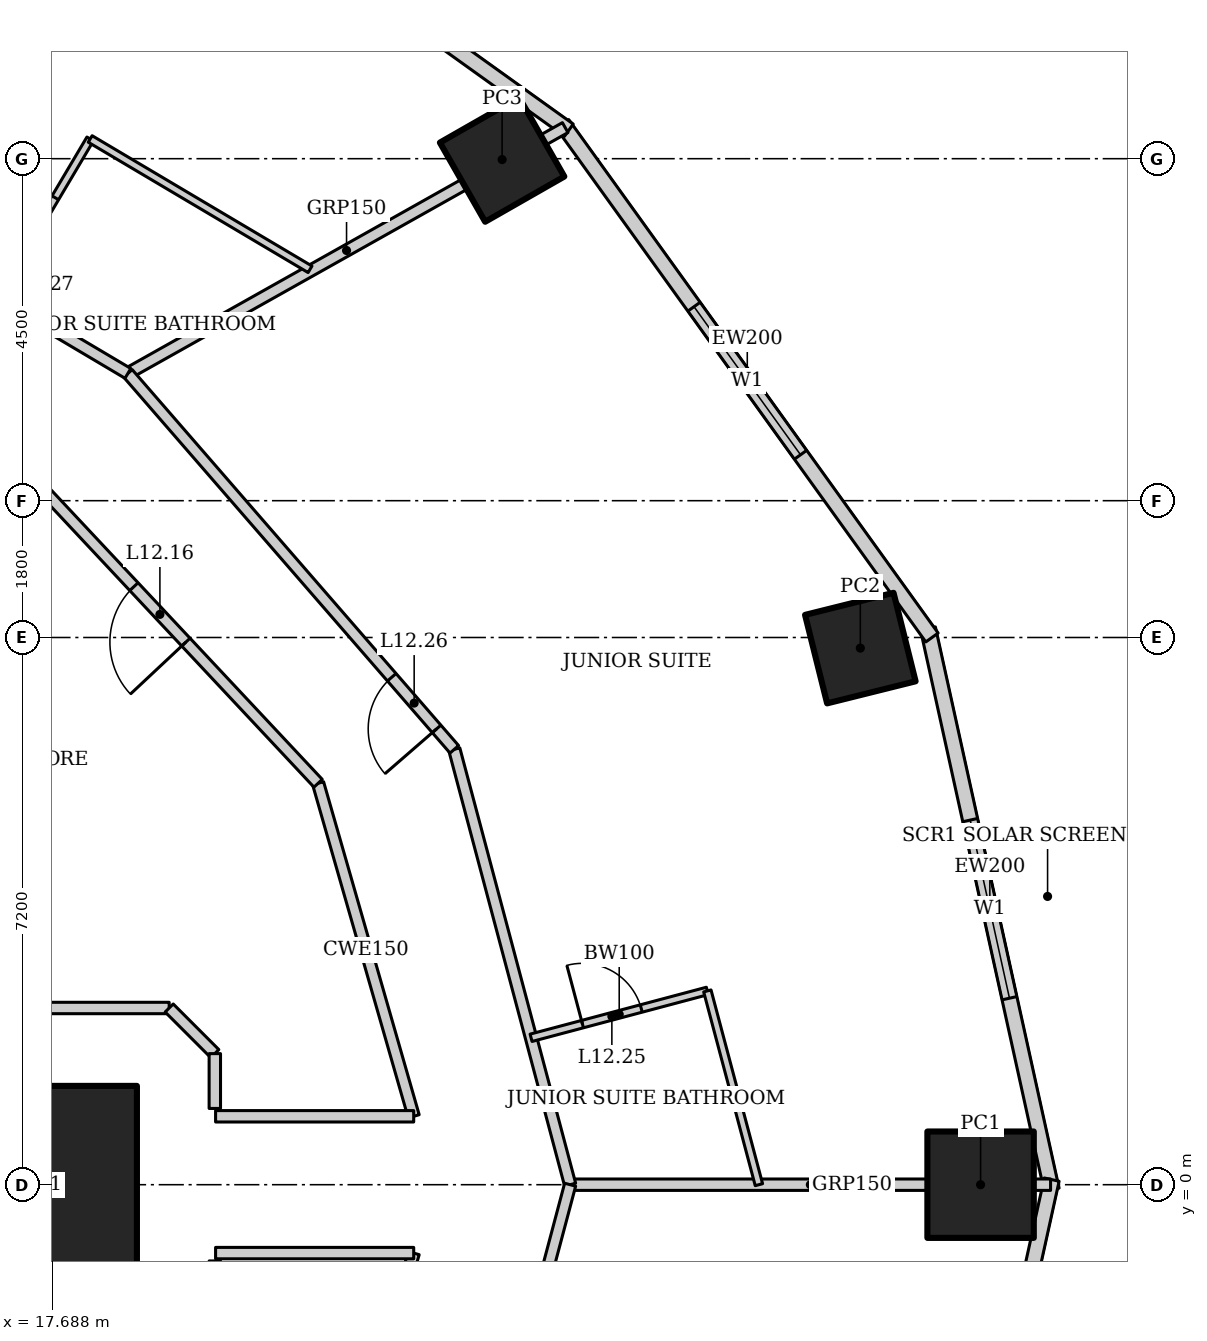
"""IFC4 building model, lengths in metres.
Left out: names, types, materials, properties, quantities, classifications, styles, units other than length and angle.
Written with IfcOpenShell. Run it as: python <this file> out.ifc"""

import sys

from ifc_helpers import new_model, si_unit, direction, frame, frame_2d, origin, origin_2d, place, context, subcontext, project, spatial, rectangle, hollow_rectangle, extrude, element, fill, save


model = new_model("IFC4")
c1 = context("Model", 3, precision=1e-05, world=origin(), true_north=direction((0.0, 1.0)))
c2 = subcontext(c1, "Body", "Model", "MODEL_VIEW")
j1 = project(units=[si_unit("LENGTHUNIT", "METRE"), si_unit("PLANEANGLEUNIT", "RADIAN")], contexts=[c1])
p1 = place(None, origin())
s1 = spatial("IfcSite", under=j1, at=p1, CompositionType="ELEMENT")
p2 = place(p1, origin())
s2 = spatial("IfcBuilding", under=s1, at=p2, CompositionType="ELEMENT")
p3 = place(p2, frame((0.0, 0.0, 58.6)))
s3 = spatial("IfcBuildingStorey", under=s2, at=p3, CompositionType="ELEMENT", Elevation=58.6)
p4 = place(p3, frame((17.5, 0.0, 0.0), z_axis=(0.0, 0.0, 1.0), x_axis=(1.0, 0.0, 0.0)))
e1 = element("IfcColumn", 1, at=p4, inside=s3, PredefinedType="COLUMN", context=c2, shape_type="SweptSolid", body=[
    extrude(hollow_rectangle(XDim=2.6, YDim=2.6, WallThickness=0.13, at=origin_2d()), origin(), (0.0, 0.0, 1.0), 3.6),
])
p5 = place(p3, frame((29.9, 0.0, 0.0), z_axis=(0.0, 0.0, 1.0), x_axis=(1.0, 0.0, 0.0)))
e2 = element("IfcColumn", 2, at=p5, inside=s3, PredefinedType="COLUMN", context=c2, shape_type="SweptSolid", body=[
    extrude(hollow_rectangle(XDim=1.4, YDim=1.4, WallThickness=0.1, at=origin_2d()), origin(), (0.0, 0.0, 1.0), 3.6),
])
p6 = place(p3, frame((28.318, 7.06, 0.0), z_axis=(0.0, 0.0, 1.0), x_axis=(0.970295726276, 0.2419218956, 0.0)))
e3 = element("IfcColumn", 3, at=p6, inside=s3, PredefinedType="COLUMN", context=c2, shape_type="SweptSolid", body=[
    extrude(hollow_rectangle(XDim=1.2, YDim=1.2, WallThickness=0.1, at=origin_2d()), origin(), (0.0, 0.0, 1.0), 3.6),
])
p7 = place(p3, frame((23.605, 13.489, 0.0), z_axis=(0.0, 0.0, 1.0), x_axis=(0.86824298017, 0.496139221777, 0.0)))
e4 = element("IfcColumn", 4, at=p7, inside=s3, PredefinedType="COLUMN", context=c2, shape_type="SweptSolid", body=[
    extrude(hollow_rectangle(XDim=1.2, YDim=1.2, WallThickness=0.12, at=origin_2d()), origin(), (0.0, 0.0, 1.0), 3.6),
])
p8 = place(p3, frame((30.835, -0.067, 0.0), z_axis=(0.0, 0.0, 1.0), x_axis=(-0.215238065514, 0.976561608478, 0.0)))
e5 = element("IfcWall", 5, at=p8, inside=s3, PredefinedType="SOLIDWALL", context=c2, shape_type="SweptSolid", body=[
    extrude(rectangle(XDim=7.562, YDim=0.2, at=frame_2d((3.781, 0.0))), origin(), (0.0, 0.0, 1.0), 3.45),
])
p9 = place(p8, frame((2.581, 0.0, 0.5)))
e6 = element("IfcOpeningElement", 6, at=p9, cuts=e5, PredefinedType="OPENING", context=c2, shape_type="SweptSolid", body=[
    extrude(rectangle(XDim=2.4, YDim=2.2, at=frame_2d((1.2, 1.1))), frame((0.0, 0.11, 0.0), z_axis=(0.0, -1.0, 0.0), x_axis=(1.0, 0.0, 0.0)), (0.0, 0.0, 1.0), 0.22),
])
p10 = place(p3, frame((29.26, 7.2, 0.0), z_axis=(0.0, 0.0, 1.0), x_axis=(-0.583937613703, 0.811798536155, 0.0)))
e7 = element("IfcWall", 7, at=p10, inside=s3, PredefinedType="SOLIDWALL", context=c2, shape_type="SweptSolid", body=[
    extrude(rectangle(XDim=8.323, YDim=0.2, at=frame_2d((4.162, 0.0))), origin(), (0.0, 0.0, 1.0), 3.45),
])
p11 = place(p10, frame((2.961, 0.0, 0.5)))
e8 = element("IfcOpeningElement", 8, at=p11, cuts=e7, PredefinedType="OPENING", context=c2, shape_type="SweptSolid", body=[
    extrude(rectangle(XDim=2.4, YDim=2.2, at=frame_2d((1.2, 1.1))), frame((0.0, 0.11, 0.0), z_axis=(0.0, -1.0, 0.0), x_axis=(1.0, 0.0, 0.0)), (0.0, 0.0, 1.0), 0.22),
])
p12 = place(p3, frame((24.482, 13.875, 0.0), z_axis=(0.0, 0.0, 1.0), x_axis=(-0.812791321576, 0.582554948112, 0.0)))
e9 = element("IfcWall", 9, at=p12, inside=s3, PredefinedType="SOLIDWALL", context=c2, shape_type="SweptSolid", body=[
    extrude(rectangle(XDim=8.063, YDim=0.2, at=frame_2d((4.032, 0.0))), origin(), (0.0, 0.0, 1.0), 3.45),
])
p13 = place(p12, frame((2.832, 0.0, 0.5)))
e10 = element("IfcOpeningElement", 10, at=p13, cuts=e9, PredefinedType="OPENING", context=c2, shape_type="SweptSolid", body=[
    extrude(rectangle(XDim=2.4, YDim=2.2, at=frame_2d((1.2, 1.1))), frame((0.0, 0.11, 0.0), z_axis=(0.0, -1.0, 0.0), x_axis=(1.0, 0.0, 0.0)), (0.0, 0.0, 1.0), 0.22),
])
p14 = place(p3, frame((29.208, -7.318, 0.0), z_axis=(0.0, 0.0, 1.0), x_axis=(0.215238065514, 0.976561608478, 0.0)))
e11 = element("IfcWall", 11, at=p14, inside=s3, PredefinedType="SOLIDWALL", context=c2, shape_type="SweptSolid", body=[
    extrude(rectangle(XDim=7.562, YDim=0.2, at=frame_2d((3.781, 0.0))), origin(), (0.0, 0.0, 1.0), 3.45),
])
p15 = place(p14, frame((2.581, 0.0, 0.5)))
e12 = element("IfcOpeningElement", 12, at=p15, cuts=e11, PredefinedType="OPENING", context=c2, shape_type="SweptSolid", body=[
    extrude(rectangle(XDim=2.4, YDim=2.2, at=frame_2d((1.2, 1.1))), frame((0.0, 0.11, 0.0), z_axis=(0.0, -1.0, 0.0), x_axis=(1.0, 0.0, 0.0)), (0.0, 0.0, 1.0), 0.22),
])
p16 = place(p3, frame((30.821, 0.0, 0.0), z_axis=(0.0, 0.0, 1.0), x_axis=(-1.0, 0.0, 0.0)))
e13 = element("IfcWall", 13, at=p16, inside=s3, PredefinedType="PARTITIONING", context=c2, shape_type="SweptSolid", body=[
    extrude(rectangle(XDim=6.321, YDim=0.15, at=frame_2d((3.16, 0.0))), origin(), (0.0, 0.0, 1.0), 2.528),
])
p17 = place(p3, frame((24.435, 13.909, 0.0), z_axis=(0.0, 0.0, 1.0), x_axis=(-0.871747379892, -0.489955616001, 0.0)))
e14 = element("IfcWall", 14, at=p17, inside=s3, PredefinedType="PARTITIONING", context=c2, shape_type="SweptSolid", body=[
    extrude(rectangle(XDim=6.6, YDim=0.15, at=frame_2d((3.3, 0.0))), origin(), (0.0, 0.0, 1.0), 2.693),
])
p18 = place(p3, frame((24.5, 0.0, 0.0), z_axis=(0.0, 0.0, 1.0), x_axis=(-0.257083265334, 0.966389256296, 0.0)))
e15 = element("IfcWall", 15, at=p18, inside=s3, PredefinedType="PARTITIONING", context=c2, shape_type="SweptSolid", body=[
    extrude(rectangle(XDim=5.928, YDim=0.15, at=frame_2d((2.964, 0.0))), origin(), (0.0, 0.0, 1.0), 3.45),
])
p19 = place(p3, frame((22.976, 5.729, 0.0), z_axis=(0.0, 0.0, 1.0), x_axis=(-0.655599989166, 0.755108372491, 0.0)))
e16 = element("IfcWall", 16, at=p19, inside=s3, PredefinedType="PARTITIONING", context=c2, shape_type="SweptSolid", body=[
    extrude(rectangle(XDim=6.551, YDim=0.15, at=frame_2d((3.275, 0.0))), origin(), (0.0, 0.0, 1.0), 3.45),
])
p20 = place(p19, frame((0.356, 0.0, 0.0)))
e17 = element("IfcOpeningElement", 17, at=p20, cuts=e16, PredefinedType="OPENING", context=c2, shape_type="SweptSolid", body=[
    extrude(rectangle(XDim=0.9, YDim=2.1, at=frame_2d((0.45, 1.05))), frame((0.0, 0.085, 0.0), z_axis=(0.0, -1.0, 0.0), x_axis=(1.0, 0.0, 0.0)), (0.0, 0.0, 1.0), 0.17),
])
p21 = place(p3, frame((18.681, 10.675, 0.0), z_axis=(0.0, 0.0, 1.0), x_axis=(-0.860147339762, 0.510045639036, 0.0)))
e18 = element("IfcWall", 18, at=p21, inside=s3, PredefinedType="PARTITIONING", context=c2, shape_type="SweptSolid", body=[
    extrude(rectangle(XDim=6.19, YDim=0.15, at=frame_2d((3.095, 0.0))), origin(), (0.0, 0.0, 1.0), 3.45),
])
p22 = place(p3, frame((22.976, -5.729, 0.0), z_axis=(0.0, 0.0, 1.0), x_axis=(0.257083265334, 0.966389256296, 0.0)))
e19 = element("IfcWall", 19, at=p22, inside=s3, PredefinedType="PARTITIONING", context=c2, shape_type="SweptSolid", body=[
    extrude(rectangle(XDim=5.928, YDim=0.15, at=frame_2d((2.964, 0.0))), origin(), (0.0, 0.0, 1.0), 3.45),
])
p23 = place(p22, frame((1.794, 0.0, 0.0)))
e20 = element("IfcOpeningElement", 20, at=p23, cuts=e19, PredefinedType="OPENING", context=c2, shape_type="SweptSolid", body=[
    extrude(rectangle(XDim=0.9, YDim=2.1, at=frame_2d((0.45, 1.05))), frame((0.0, 0.085, 0.0), z_axis=(0.0, -1.0, 0.0), x_axis=(1.0, 0.0, 0.0)), (0.0, 0.0, 1.0), 0.17),
])
p24 = place(p3, frame((22.442, 0.9, 0.0), z_axis=(0.0, 0.0, 1.0), x_axis=(-0.27585972825, 0.961197903831, 0.0)))
e21 = element("IfcWall", 21, at=p24, inside=s3, PredefinedType="PARTITIONING", context=c2, shape_type="SweptSolid", body=[
    extrude(rectangle(XDim=4.559, YDim=0.15, at=frame_2d((2.279, 0.0))), origin(), (0.0, 0.0, 1.0), 3.45),
])
p25 = place(p3, frame((21.184, 5.282, 0.0), z_axis=(0.0, 0.0, 1.0), x_axis=(-0.68365836236, 0.729802194828, 0.0)))
e22 = element("IfcWall", 22, at=p25, inside=s3, PredefinedType="PARTITIONING", context=c2, shape_type="SweptSolid", body=[
    extrude(rectangle(XDim=6.09, YDim=0.15, at=frame_2d((3.045, 0.0))), origin(), (0.0, 0.0, 1.0), 3.45),
])
p26 = place(p25, frame((2.545, 0.0, 0.0)))
e23 = element("IfcOpeningElement", 23, at=p26, cuts=e22, PredefinedType="OPENING", context=c2, shape_type="SweptSolid", body=[
    extrude(rectangle(XDim=1.0, YDim=2.1, at=frame_2d((0.5, 1.05))), frame((0.0, 0.085, 0.0), z_axis=(0.0, -1.0, 0.0), x_axis=(1.0, 0.0, 0.0)), (0.0, 0.0, 1.0), 0.17),
])
p27 = place(p3, frame((21.184, -5.282, 0.0), z_axis=(0.0, 0.0, 1.0), x_axis=(0.27585972825, 0.961197903831, 0.0)))
e24 = element("IfcWall", 24, at=p27, inside=s3, PredefinedType="PARTITIONING", context=c2, shape_type="SweptSolid", body=[
    extrude(rectangle(XDim=4.559, YDim=0.15, at=frame_2d((2.279, 0.0))), origin(), (0.0, 0.0, 1.0), 3.45),
])
p28 = place(p3, frame((23.986, 1.933, 0.0), z_axis=(0.0, 0.0, 1.0), x_axis=(0.96639514992, 0.257061109879, 0.0)))
e25 = element("IfcWall", 25, at=p28, inside=s3, PredefinedType="PARTITIONING", context=c2, shape_type="SweptSolid", body=[
    extrude(rectangle(XDim=2.4, YDim=0.1, at=frame_2d((1.2, 0.0))), origin(), (0.0, 0.0, 1.0), 3.45),
])
p29 = place(p28, frame((0.7, 0.0, 0.0)))
e26 = element("IfcOpeningElement", 26, at=p29, cuts=e25, PredefinedType="OPENING", context=c2, shape_type="SweptSolid", body=[
    extrude(rectangle(XDim=0.8, YDim=2.1, at=frame_2d((0.4, 1.05))), frame((0.0, 0.06, 0.0), z_axis=(0.0, -1.0, 0.0), x_axis=(1.0, 0.0, 0.0)), (0.0, 0.0, 1.0), 0.12),
])
p30 = place(p3, frame((26.305, 2.55, 0.0), z_axis=(0.0, 0.0, 1.0), x_axis=(0.257052122515, -0.966397540513, 0.0)))
e27 = element("IfcWall", 27, at=p30, inside=s3, PredefinedType="PARTITIONING", context=c2, shape_type="SweptSolid", body=[
    extrude(rectangle(XDim=2.638, YDim=0.1, at=frame_2d((1.319, 0.0))), origin(), (0.0, 0.0, 1.0), 3.45),
])
p31 = place(p3, frame((16.961, 11.695, 0.0), z_axis=(0.0, 0.0, 1.0), x_axis=(0.510075642074, 0.860129548012, 0.0)))
e28 = element("IfcWall", 28, at=p31, inside=s3, PredefinedType="PARTITIONING", context=c2, shape_type="SweptSolid", body=[
    extrude(rectangle(XDim=2.4, YDim=0.1, at=frame_2d((1.2, 0.0))), origin(), (0.0, 0.0, 1.0), 3.45),
])
p32 = place(p31, frame((0.7, 0.0, 0.0)))
e29 = element("IfcOpeningElement", 29, at=p32, cuts=e28, PredefinedType="OPENING", context=c2, shape_type="SweptSolid", body=[
    extrude(rectangle(XDim=0.8, YDim=2.1, at=frame_2d((0.4, 1.05))), frame((0.0, 0.06, 0.0), z_axis=(0.0, -1.0, 0.0), x_axis=(1.0, 0.0, 0.0)), (0.0, 0.0, 1.0), 0.12),
])
p33 = place(p3, frame((18.185, 13.76, 0.0), z_axis=(0.0, 0.0, 1.0), x_axis=(0.860146437071, -0.510047161343, 0.0)))
e30 = element("IfcWall", 30, at=p33, inside=s3, PredefinedType="PARTITIONING", context=c2, shape_type="SweptSolid", body=[
    extrude(rectangle(XDim=3.363, YDim=0.1, at=frame_2d((1.681, 0.0))), origin(), (0.0, 0.0, 1.0), 3.45),
])
for number, where, z_axis, x_axis in (
    (31, (19.835, -0.9, 0.0), (0.0, 0.0, 1.0), (1.0, 0.0, 0.0)),
    (32, (19.835, 0.9, 0.0), (0.0, 0.0, 1.0), (1.0, 0.0, 0.0)),
):
    element("IfcWall", number, at=place(p3, frame(where, z_axis=z_axis, x_axis=x_axis)), inside=s3, PredefinedType="PARTITIONING", context=c2, shape_type="SweptSolid", body=[
        extrude(rectangle(XDim=2.607, YDim=0.15, at=frame_2d((1.303, 0.0))), origin(), (0.0, 0.0, 1.0), 3.45),
    ])
p34 = place(p3, frame((15.775, 2.325, 0.0), z_axis=(0.0, 0.0, 1.0), x_axis=(1.0, 0.0, 0.0)))
e33 = element("IfcWall", 33, at=p34, inside=s3, PredefinedType="PARTITIONING", context=c2, shape_type="SweptSolid", body=[
    extrude(rectangle(XDim=3.449, YDim=0.15, at=frame_2d((1.725, 0.0))), origin(), (0.0, 0.0, 1.0), 3.45),
])
p35 = place(p3, frame((19.225, 2.325, 0.0), z_axis=(0.0, 0.0, 1.0), x_axis=(0.707106781187, -0.707106781187, 0.0)))
e34 = element("IfcWall", 34, at=p35, inside=s3, PredefinedType="PARTITIONING", context=c2, shape_type="SweptSolid", body=[
    extrude(rectangle(XDim=0.849, YDim=0.15, at=frame_2d((0.425, 0.0))), origin(), (0.0, 0.0, 1.0), 3.45),
])
p36 = place(p3, frame((19.825, 1.725, 0.0), z_axis=(0.0, 0.0, 1.0), x_axis=(0.0, -1.0, 0.0)))
e35 = element("IfcWall", 35, at=p36, inside=s3, PredefinedType="PARTITIONING", context=c2, shape_type="SweptSolid", body=[
    extrude(rectangle(XDim=0.721, YDim=0.15, at=frame_2d((0.361, 0.0))), origin(), (0.0, 0.0, 1.0), 3.45),
])
p37 = place(p9, origin())
e36 = element("IfcWindow", 36, at=p37, inside=s3, PartitioningType="SINGLE_PANEL", PredefinedType="WINDOW", context=c2, shape_type="SweptSolid", body=[
    extrude(rectangle(XDim=2.4, YDim=2.2, at=frame_2d((1.2, 1.1))), frame((0.0, 0.03, 0.0), z_axis=(0.0, -1.0, 0.0), x_axis=(1.0, 0.0, 0.0)), (0.0, 0.0, 1.0), 0.06),
])
fill(e6, e36)
p38 = place(p11, origin())
e37 = element("IfcWindow", 37, at=p38, inside=s3, PartitioningType="SINGLE_PANEL", PredefinedType="WINDOW", context=c2, shape_type="SweptSolid", body=[
    extrude(rectangle(XDim=2.4, YDim=2.2, at=frame_2d((1.2, 1.1))), frame((0.0, 0.03, 0.0), z_axis=(0.0, -1.0, 0.0), x_axis=(1.0, 0.0, 0.0)), (0.0, 0.0, 1.0), 0.06),
])
fill(e8, e37)
p39 = place(p26, origin())
e38 = element("IfcDoor", 38, at=p39, inside=s3, OperationType="SINGLE_SWING_LEFT", PredefinedType="DOOR", context=c2, shape_type="SweptSolid", body=[
    extrude(rectangle(XDim=1.0, YDim=2.1, at=frame_2d((0.5, 1.05))), frame((0.0, 0.025, 0.0), z_axis=(0.0, -1.0, 0.0), x_axis=(1.0, 0.0, 0.0)), (0.0, 0.0, 1.0), 0.05),
])
fill(e23, e38)
p40 = place(p29, origin())
e39 = element("IfcDoor", 39, at=p40, inside=s3, OperationType="SINGLE_SWING_LEFT", PredefinedType="DOOR", context=c2, shape_type="SweptSolid", body=[
    extrude(rectangle(XDim=0.8, YDim=2.1, at=frame_2d((0.4, 1.05))), frame((0.0, 0.025, 0.0), z_axis=(0.0, -1.0, 0.0), x_axis=(1.0, 0.0, 0.0)), (0.0, 0.0, 1.0), 0.05),
])
fill(e26, e39)
p41 = place(p20, origin())
e40 = element("IfcDoor", 40, at=p41, inside=s3, OperationType="SINGLE_SWING_LEFT", PredefinedType="DOOR", context=c2, shape_type="SweptSolid", body=[
    extrude(rectangle(XDim=0.9, YDim=2.1, at=frame_2d((0.45, 1.05))), frame((0.0, 0.025, 0.0), z_axis=(0.0, -1.0, 0.0), x_axis=(1.0, 0.0, 0.0)), (0.0, 0.0, 1.0), 0.05),
])
fill(e17, e40)
p42 = place(p32, origin())
e41 = element("IfcDoor", 41, at=p42, inside=s3, OperationType="SINGLE_SWING_LEFT", PredefinedType="DOOR", context=c2, shape_type="SweptSolid", body=[
    extrude(rectangle(XDim=0.8, YDim=2.1, at=frame_2d((0.4, 1.05))), frame((0.0, 0.025, 0.0), z_axis=(0.0, -1.0, 0.0), x_axis=(1.0, 0.0, 0.0)), (0.0, 0.0, 1.0), 0.05),
])
fill(e29, e41)
save(model, sys.argv[1])
